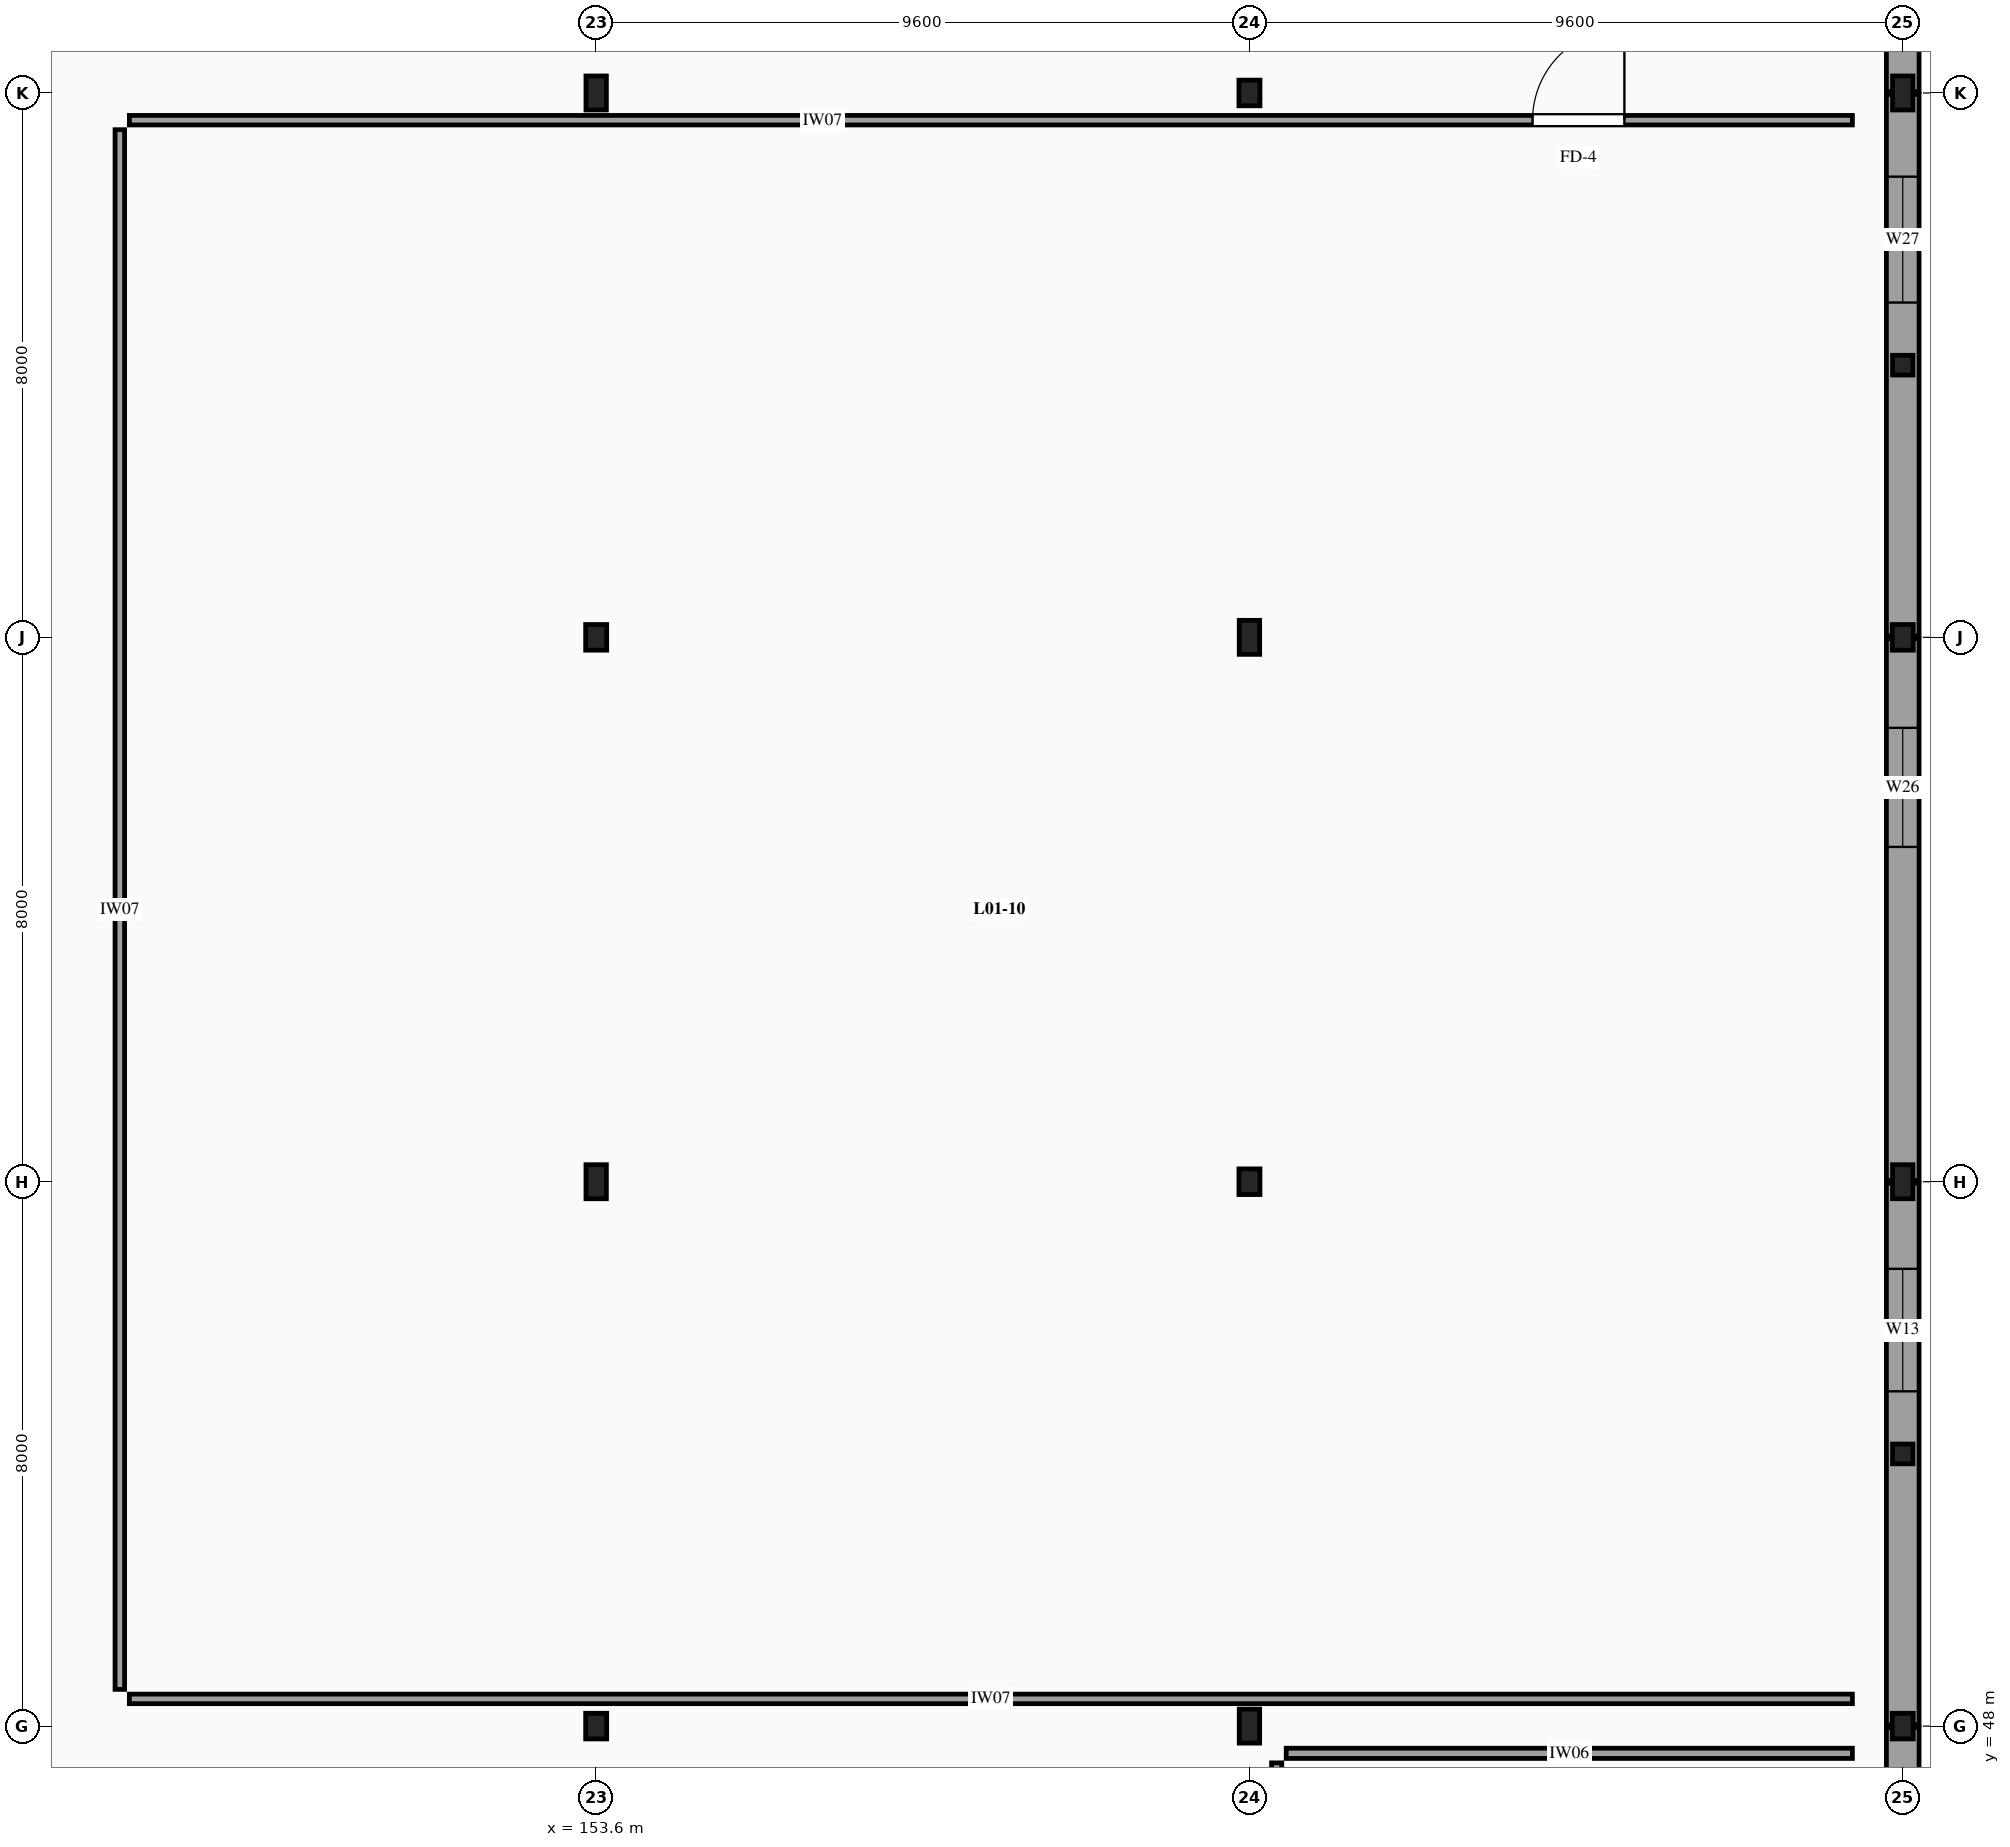
"""IFC4 building model, lengths in metres.
Left out: names, types, materials, properties, quantities, classifications, styles, units other than length and angle.
Written with IfcOpenShell. Run it as: python <this file> out.ifc"""

import sys

from ifc_helpers import new_model, si_unit, direction, frame, frame_2d, origin, origin_2d, place, context, subcontext, project, spatial, rectangle, i_section, extrude, element, fill, save


model = new_model("IFC4")
c1 = context("Model", 3, precision=1e-05, world=origin(), true_north=direction((0.0, 1.0)))
c2 = subcontext(c1, "Body", "Model", "MODEL_VIEW")
j1 = project(units=[si_unit("LENGTHUNIT", "METRE"), si_unit("PLANEANGLEUNIT", "RADIAN")], contexts=[c1])
p1 = place(None, origin())
s1 = spatial("IfcSite", under=j1, at=p1, CompositionType="ELEMENT")
p2 = place(p1, origin())
s2 = spatial("IfcBuilding", under=s1, at=p2, CompositionType="ELEMENT")
p3 = place(p2, frame((0.0, 0.0, 4.5)))
s3 = spatial("IfcBuildingStorey", under=s2, at=p3, CompositionType="ELEMENT", Elevation=4.5)
p4 = place(p3, frame((153.6, 48.0, -0.26), z_axis=(0.0, 0.0, 1.0), x_axis=(1.0, 0.0, 0.0)))
e1 = element("IfcColumn", 1, at=p4, inside=s3, PredefinedType="COLUMN", context=c2, shape_type="SweptSolid", body=[
    extrude(i_section(OverallWidth=0.309, OverallDepth=0.377, WebThickness=0.021, FlangeThickness=0.04, FilletRadius=0.027, at=origin_2d()), origin(), (0.0, 0.0, 1.0), 4.2),
])
p5 = place(p3, frame((153.6, 56.0, -0.26), z_axis=(0.0, 0.0, 1.0), x_axis=(1.0, 0.0, 0.0)))
e2 = element("IfcColumn", 2, at=p5, inside=s3, PredefinedType="COLUMN", context=c2, shape_type="SweptSolid", body=[
    extrude(i_section(OverallWidth=0.3, OverallDepth=0.5, WebThickness=0.014, FlangeThickness=0.028, FilletRadius=0.027, at=origin_2d()), origin(), (0.0, 0.0, 1.0), 4.2),
])
p6 = place(p3, frame((153.6, 64.0, -0.26), z_axis=(0.0, 0.0, 1.0), x_axis=(1.0, 0.0, 0.0)))
e3 = element("IfcColumn", 3, at=p6, inside=s3, PredefinedType="COLUMN", context=c2, shape_type="SweptSolid", body=[
    extrude(i_section(OverallWidth=0.309, OverallDepth=0.377, WebThickness=0.021, FlangeThickness=0.04, FilletRadius=0.027, at=origin_2d()), origin(), (0.0, 0.0, 1.0), 4.2),
])
for number, where, z_axis, x_axis in (
    (4, (153.6, 72.0, -0.26), (0.0, 0.0, 1.0), (1.0, 0.0, 0.0)),
    (5, (163.2, 48.0, -0.26), (0.0, 0.0, 1.0), (1.0, 0.0, 0.0)),
):
    element("IfcColumn", number, at=place(p3, frame(where, z_axis=z_axis, x_axis=x_axis)), inside=s3, PredefinedType="COLUMN", context=c2, shape_type="SweptSolid", body=[
        extrude(i_section(OverallWidth=0.3, OverallDepth=0.5, WebThickness=0.014, FlangeThickness=0.028, FilletRadius=0.027, at=origin_2d()), origin(), (0.0, 0.0, 1.0), 4.2),
    ])
p7 = place(p3, frame((163.2, 56.0, -0.26), z_axis=(0.0, 0.0, 1.0), x_axis=(1.0, 0.0, 0.0)))
e6 = element("IfcColumn", 6, at=p7, inside=s3, PredefinedType="COLUMN", context=c2, shape_type="SweptSolid", body=[
    extrude(i_section(OverallWidth=0.309, OverallDepth=0.377, WebThickness=0.021, FlangeThickness=0.04, FilletRadius=0.027, at=origin_2d()), origin(), (0.0, 0.0, 1.0), 4.2),
])
p8 = place(p3, frame((163.2, 64.0, -0.26), z_axis=(0.0, 0.0, 1.0), x_axis=(1.0, 0.0, 0.0)))
e7 = element("IfcColumn", 7, at=p8, inside=s3, PredefinedType="COLUMN", context=c2, shape_type="SweptSolid", body=[
    extrude(i_section(OverallWidth=0.3, OverallDepth=0.5, WebThickness=0.014, FlangeThickness=0.028, FilletRadius=0.027, at=origin_2d()), origin(), (0.0, 0.0, 1.0), 4.2),
])
for number, where, z_axis, x_axis in (
    (8, (163.2, 72.0, -0.26), (0.0, 0.0, 1.0), (1.0, 0.0, 0.0)),
    (9, (172.8, 48.0, -0.26), (0.0, 0.0, 1.0), (1.0, 0.0, 0.0)),
):
    element("IfcColumn", number, at=place(p3, frame(where, z_axis=z_axis, x_axis=x_axis)), inside=s3, PredefinedType="COLUMN", context=c2, shape_type="SweptSolid", body=[
        extrude(i_section(OverallWidth=0.309, OverallDepth=0.377, WebThickness=0.021, FlangeThickness=0.04, FilletRadius=0.027, at=origin_2d()), origin(), (0.0, 0.0, 1.0), 4.2),
    ])
p9 = place(p3, frame((172.8, 56.0, -0.26), z_axis=(0.0, 0.0, 1.0), x_axis=(1.0, 0.0, 0.0)))
e10 = element("IfcColumn", 10, at=p9, inside=s3, PredefinedType="COLUMN", context=c2, shape_type="SweptSolid", body=[
    extrude(i_section(OverallWidth=0.3, OverallDepth=0.5, WebThickness=0.014, FlangeThickness=0.028, FilletRadius=0.027, at=origin_2d()), origin(), (0.0, 0.0, 1.0), 4.2),
])
p10 = place(p3, frame((172.8, 64.0, -0.26), z_axis=(0.0, 0.0, 1.0), x_axis=(1.0, 0.0, 0.0)))
e11 = element("IfcColumn", 11, at=p10, inside=s3, PredefinedType="COLUMN", context=c2, shape_type="SweptSolid", body=[
    extrude(i_section(OverallWidth=0.309, OverallDepth=0.377, WebThickness=0.021, FlangeThickness=0.04, FilletRadius=0.027, at=origin_2d()), origin(), (0.0, 0.0, 1.0), 4.2),
])
p11 = place(p3, frame((172.8, 72.0, -0.26), z_axis=(0.0, 0.0, 1.0), x_axis=(1.0, 0.0, 0.0)))
e12 = element("IfcColumn", 12, at=p11, inside=s3, PredefinedType="COLUMN", context=c2, shape_type="SweptSolid", body=[
    extrude(i_section(OverallWidth=0.3, OverallDepth=0.5, WebThickness=0.014, FlangeThickness=0.028, FilletRadius=0.027, at=origin_2d()), origin(), (0.0, 0.0, 1.0), 4.2),
])
for number, where, z_axis, x_axis in (
    (13, (172.8, 52.0, -0.26), (0.0, 0.0, 1.0), (1.0, 0.0, 0.0)),
    (14, (172.8, 68.0, -0.26), (0.0, 0.0, 1.0), (1.0, 0.0, 0.0)),
):
    element("IfcColumn", number, at=place(p3, frame(where, z_axis=z_axis, x_axis=x_axis)), inside=s3, PredefinedType="PILASTER", context=c2, shape_type="SweptSolid", body=[
        extrude(i_section(OverallWidth=0.3, OverallDepth=0.29, WebThickness=0.009, FlangeThickness=0.014, FilletRadius=0.027, at=origin_2d()), origin(), (0.0, 0.0, 1.0), 4.2),
    ])
p12 = place(p3, frame((172.8, 40.02, 0.0), z_axis=(0.0, 0.0, 1.0), x_axis=(0.0, 1.0, 0.0)))
e15 = element("IfcWall", 15, at=p12, inside=s3, PredefinedType="SOLIDWALL", context=c2, shape_type="SweptSolid", body=[
    extrude(rectangle(XDim=7.96, YDim=0.48, at=frame_2d((3.98, 0.0))), origin(), (0.0, 0.0, 1.0), 3.26),
])
p13 = place(p12, frame((4.9, 0.0, 0.72)))
e16 = element("IfcOpeningElement", 16, at=p13, cuts=e15, PredefinedType="OPENING", context=c2, shape_type="SweptSolid", body=[
    extrude(rectangle(XDim=1.8, YDim=1.6, at=frame_2d((0.9, 0.8))), frame((0.0, 0.25, 0.0), z_axis=(0.0, -1.0, 0.0), x_axis=(1.0, 0.0, 0.0)), (0.0, 0.0, 1.0), 0.5),
])
p14 = place(p3, frame((172.8, 48.02, 0.0), z_axis=(0.0, 0.0, 1.0), x_axis=(0.0, 1.0, 0.0)))
e17 = element("IfcWall", 17, at=p14, inside=s3, PredefinedType="SOLIDWALL", context=c2, shape_type="SweptSolid", body=[
    extrude(rectangle(XDim=7.96, YDim=0.48, at=frame_2d((3.98, 0.0))), origin(), (0.0, 0.0, 1.0), 3.26),
])
p15 = place(p14, frame((4.9, 0.0, 0.72)))
e18 = element("IfcOpeningElement", 18, at=p15, cuts=e17, PredefinedType="OPENING", context=c2, shape_type="SweptSolid", body=[
    extrude(rectangle(XDim=1.8, YDim=1.6, at=frame_2d((0.9, 0.8))), frame((0.0, 0.25, 0.0), z_axis=(0.0, -1.0, 0.0), x_axis=(1.0, 0.0, 0.0)), (0.0, 0.0, 1.0), 0.5),
])
p16 = place(p3, frame((172.8, 56.02, 0.0), z_axis=(0.0, 0.0, 1.0), x_axis=(0.0, 1.0, 0.0)))
e19 = element("IfcWall", 19, at=p16, inside=s3, PredefinedType="SOLIDWALL", context=c2, shape_type="SweptSolid", body=[
    extrude(rectangle(XDim=7.96, YDim=0.48, at=frame_2d((3.98, 0.0))), origin(), (0.0, 0.0, 1.0), 3.26),
])
p17 = place(p16, frame((4.9, 0.0, 0.72)))
e20 = element("IfcOpeningElement", 20, at=p17, cuts=e19, PredefinedType="OPENING", context=c2, shape_type="SweptSolid", body=[
    extrude(rectangle(XDim=1.75, YDim=2.3, at=frame_2d((0.875, 1.15))), frame((0.0, 0.25, 0.0), z_axis=(0.0, -1.0, 0.0), x_axis=(1.0, 0.0, 0.0)), (0.0, 0.0, 1.0), 0.5),
])
p18 = place(p3, frame((172.8, 64.02, 0.0), z_axis=(0.0, 0.0, 1.0), x_axis=(0.0, 1.0, 0.0)))
e21 = element("IfcWall", 21, at=p18, inside=s3, PredefinedType="SOLIDWALL", context=c2, shape_type="SweptSolid", body=[
    extrude(rectangle(XDim=7.96, YDim=0.48, at=frame_2d((3.98, 0.0))), origin(), (0.0, 0.0, 1.0), 3.26),
])
p19 = place(p18, frame((4.9, 0.0, 0.9)))
e22 = element("IfcOpeningElement", 22, at=p19, cuts=e21, PredefinedType="OPENING", context=c2, shape_type="SweptSolid", body=[
    extrude(rectangle(XDim=1.85, YDim=1.9, at=frame_2d((0.925, 0.95))), frame((0.0, 0.25, 0.0), z_axis=(0.0, -1.0, 0.0), x_axis=(1.0, 0.0, 0.0)), (0.0, 0.0, 1.0), 0.5),
])
p20 = place(p3, frame((172.8, 72.02, 0.0), z_axis=(0.0, 0.0, 1.0), x_axis=(0.0, 1.0, 0.0)))
e23 = element("IfcWall", 23, at=p20, inside=s3, PredefinedType="SOLIDWALL", context=c2, shape_type="SweptSolid", body=[
    extrude(rectangle(XDim=7.96, YDim=0.48, at=frame_2d((3.98, 0.0))), origin(), (0.0, 0.0, 1.0), 3.26),
])
p21 = place(p20, frame((4.9, 0.0, 0.9)))
e24 = element("IfcOpeningElement", 24, at=p21, cuts=e23, PredefinedType="OPENING", context=c2, shape_type="SweptSolid", body=[
    extrude(rectangle(XDim=1.2, YDim=2.0, at=frame_2d((0.6, 1.0))), frame((0.0, 0.25, 0.0), z_axis=(0.0, -1.0, 0.0), x_axis=(1.0, 0.0, 0.0)), (0.0, 0.0, 1.0), 0.5),
])
p22 = place(p3, frame((163.74, 47.6, 0.0), z_axis=(0.0, 0.0, 1.0), x_axis=(1.0, 0.0, 0.0)))
e25 = element("IfcWall", 25, at=p22, inside=s3, PredefinedType="PARTITIONING", context=c2, shape_type="SweptSolid", body=[
    extrude(rectangle(XDim=8.32, YDim=0.15, at=frame_2d((4.16, 0.0))), origin(), (0.0, 0.0, 1.0), 3.1),
])
p23 = place(p3, frame((163.6, 32.54, 0.0), z_axis=(0.0, 0.0, 1.0), x_axis=(0.0, 1.0, 0.0)))
e26 = element("IfcWall", 26, at=p23, inside=s3, PredefinedType="PARTITIONING", context=c2, shape_type="SweptSolid", body=[
    extrude(rectangle(XDim=14.92, YDim=0.15, at=frame_2d((7.46, 0.0))), origin(), (0.0, 0.0, 1.0), 3.1),
])
p24 = place(p23, frame((2.451, 0.0, 0.0)))
e27 = element("IfcOpeningElement", 27, at=p24, cuts=e26, PredefinedType="OPENING", context=c2, shape_type="SweptSolid", body=[
    extrude(rectangle(XDim=2.1, YDim=2.65, at=frame_2d((1.05, 1.325))), frame((0.0, 0.085, 0.0), z_axis=(0.0, -1.0, 0.0), x_axis=(1.0, 0.0, 0.0)), (0.0, 0.0, 1.0), 0.17),
])
p25 = place(p3, frame((146.74, 71.6, 0.0), z_axis=(0.0, 0.0, 1.0), x_axis=(1.0, 0.0, 0.0)))
e28 = element("IfcWall", 28, at=p25, inside=s3, PredefinedType="PARTITIONING", context=c2, shape_type="SweptSolid", body=[
    extrude(rectangle(XDim=25.32, YDim=0.14, at=frame_2d((12.66, 0.0))), origin(), (0.0, 0.0, 1.0), 3.1),
])
p26 = place(p25, frame((20.62, 0.0, 0.0)))
e29 = element("IfcOpeningElement", 29, at=p26, cuts=e28, PredefinedType="OPENING", context=c2, shape_type="SweptSolid", body=[
    extrude(rectangle(XDim=1.35, YDim=2.2, at=frame_2d((0.675, 1.1))), frame((0.0, 0.08, 0.0), z_axis=(0.0, -1.0, 0.0), x_axis=(1.0, 0.0, 0.0)), (0.0, 0.0, 1.0), 0.16),
])
p27 = place(p3, frame((146.74, 48.4, 0.0), z_axis=(0.0, 0.0, 1.0), x_axis=(1.0, 0.0, 0.0)))
e30 = element("IfcWall", 30, at=p27, inside=s3, PredefinedType="PARTITIONING", context=c2, shape_type="SweptSolid", body=[
    extrude(rectangle(XDim=25.32, YDim=0.14, at=frame_2d((12.66, 0.0))), origin(), (0.0, 0.0, 1.0), 3.1),
])
p28 = place(p3, frame((146.6, 48.54, 0.0), z_axis=(0.0, 0.0, 1.0), x_axis=(0.0, 1.0, 0.0)))
e31 = element("IfcWall", 31, at=p28, inside=s3, PredefinedType="PARTITIONING", context=c2, shape_type="SweptSolid", body=[
    extrude(rectangle(XDim=22.92, YDim=0.14, at=frame_2d((11.46, 0.0))), origin(), (0.0, 0.0, 1.0), 3.1),
])
p29 = place(p15, origin())
e32 = element("IfcWindow", 32, at=p29, inside=s3, PartitioningType="SINGLE_PANEL", PredefinedType="WINDOW", context=c2, shape_type="SweptSolid", body=[
    extrude(rectangle(XDim=1.8, YDim=1.6, at=frame_2d((0.9, 0.8))), frame((0.0, 0.03, 0.0), z_axis=(0.0, -1.0, 0.0), x_axis=(1.0, 0.0, 0.0)), (0.0, 0.0, 1.0), 0.06),
])
fill(e18, e32)
p30 = place(p17, origin())
e33 = element("IfcWindow", 33, at=p30, inside=s3, PartitioningType="SINGLE_PANEL", PredefinedType="WINDOW", context=c2, shape_type="SweptSolid", body=[
    extrude(rectangle(XDim=1.75, YDim=2.3, at=frame_2d((0.875, 1.15))), frame((0.0, 0.03, 0.0), z_axis=(0.0, -1.0, 0.0), x_axis=(1.0, 0.0, 0.0)), (0.0, 0.0, 1.0), 0.06),
])
fill(e20, e33)
p31 = place(p19, origin())
e34 = element("IfcWindow", 34, at=p31, inside=s3, PartitioningType="SINGLE_PANEL", PredefinedType="WINDOW", context=c2, shape_type="SweptSolid", body=[
    extrude(rectangle(XDim=1.85, YDim=1.9, at=frame_2d((0.925, 0.95))), frame((0.0, 0.03, 0.0), z_axis=(0.0, -1.0, 0.0), x_axis=(1.0, 0.0, 0.0)), (0.0, 0.0, 1.0), 0.06),
])
fill(e22, e34)
p32 = place(p26, origin())
e35 = element("IfcDoor", 35, at=p32, inside=s3, OperationType="SINGLE_SWING_RIGHT", PredefinedType="DOOR", context=c2, shape_type="SweptSolid", body=[
    extrude(rectangle(XDim=1.35, YDim=2.2, at=frame_2d((0.675, 1.1))), frame((0.0, 0.025, 0.0), z_axis=(0.0, -1.0, 0.0), x_axis=(1.0, 0.0, 0.0)), (0.0, 0.0, 1.0), 0.05),
])
fill(e29, e35)
save(model, sys.argv[1])
